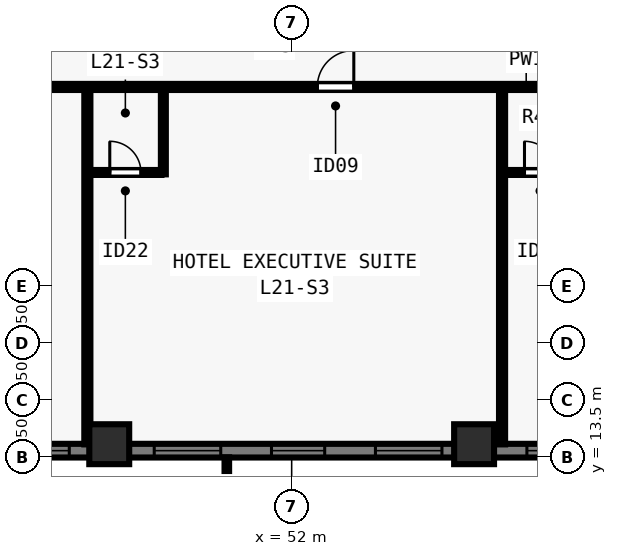
"""IFC4 building model, lengths in metres.
Left out: names, types, materials, properties, quantities, classifications, styles, units other than length and angle.
Written with IfcOpenShell. Run it as: python <this file> out.ifc"""

import sys

from ifc_helpers import new_model, si_unit, direction, frame, frame_2d, origin, origin_2d, place, context, subcontext, project, spatial, rectangle, extrude, element, fill, save


model = new_model("IFC4")
c1 = context("Model", 3, precision=1e-05, world=origin(), true_north=direction((0.0, 1.0)))
c2 = subcontext(c1, "Body", "Model", "MODEL_VIEW")
j1 = project(units=[si_unit("LENGTHUNIT", "METRE"), si_unit("PLANEANGLEUNIT", "RADIAN")], contexts=[c1])
p1 = place(None, origin())
s1 = spatial("IfcSite", under=j1, at=p1, CompositionType="ELEMENT")
p2 = place(p1, origin())
s2 = spatial("IfcBuilding", under=s1, at=p2, CompositionType="ELEMENT")
p3 = place(p2, frame((0.0, 0.0, 79.5)))
s3 = spatial("IfcBuildingStorey", under=s2, at=p3, CompositionType="ELEMENT", Elevation=79.5)
for number, where, z_axis, x_axis in (
    (1, (47.2, 13.85, 0.0), (0.0, 0.0, 1.0), (1.0, 0.0, 0.0)),
    (2, (56.8, 13.85, 0.0), (0.0, 0.0, 1.0), (1.0, 0.0, 0.0)),
):
    element("IfcColumn", number, at=place(p3, frame(where, z_axis=z_axis, x_axis=x_axis)), inside=s3, PredefinedType="COLUMN", context=c2, shape_type="SweptSolid", body=[
        extrude(rectangle(XDim=1.05, YDim=1.05, at=origin_2d()), origin(), (0.0, 0.0, 1.0), 3.5),
    ])
p4 = place(p3, frame((74.5, 13.68, 0.0), z_axis=(0.0, 0.0, 1.0), x_axis=(-1.0, 0.0, 0.0)))
e3 = element("IfcWall", 3, at=p4, inside=s3, PredefinedType="SOLIDWALL", context=c2, shape_type="SweptSolid", body=[
    extrude(rectangle(XDim=44.662, YDim=0.36, at=frame_2d((22.331, 0.0))), origin(), (0.0, 0.0, 1.0), 3.28),
])
p5 = place(p4, frame((4.655, 0.0, 0.8)))
e4 = element("IfcOpeningElement", 4, at=p5, cuts=e3, PredefinedType="OPENING", context=c2, shape_type="SweptSolid", body=[
    extrude(rectangle(XDim=1.75, YDim=1.544, at=frame_2d((0.875, 0.772))), frame((0.0, 0.19, 0.0), z_axis=(0.0, -1.0, 0.0), x_axis=(1.0, 0.0, 0.0)), (0.0, 0.0, 1.0), 0.38),
])
p6 = place(p4, frame((8.19, 0.0, 0.8)))
e5 = element("IfcOpeningElement", 5, at=p6, cuts=e3, PredefinedType="OPENING", context=c2, shape_type="SweptSolid", body=[
    extrude(rectangle(XDim=1.4, YDim=1.544, at=frame_2d((0.7, 0.772))), frame((0.0, 0.19, 0.0), z_axis=(0.0, -1.0, 0.0), x_axis=(1.0, 0.0, 0.0)), (0.0, 0.0, 1.0), 0.38),
])
p7 = place(p4, frame((11.375, 0.0, 0.8)))
e6 = element("IfcOpeningElement", 6, at=p7, cuts=e3, PredefinedType="OPENING", context=c2, shape_type="SweptSolid", body=[
    extrude(rectangle(XDim=1.75, YDim=1.544, at=frame_2d((0.875, 0.772))), frame((0.0, 0.19, 0.0), z_axis=(0.0, -1.0, 0.0), x_axis=(1.0, 0.0, 0.0)), (0.0, 0.0, 1.0), 0.38),
])
p8 = place(p4, frame((14.911, 0.0, 0.8)))
e7 = element("IfcOpeningElement", 7, at=p8, cuts=e3, PredefinedType="OPENING", context=c2, shape_type="SweptSolid", body=[
    extrude(rectangle(XDim=1.4, YDim=1.544, at=frame_2d((0.7, 0.772))), frame((0.0, 0.19, 0.0), z_axis=(0.0, -1.0, 0.0), x_axis=(1.0, 0.0, 0.0)), (0.0, 0.0, 1.0), 0.38),
])
p9 = place(p4, frame((18.546, 0.0, 0.8)))
e8 = element("IfcOpeningElement", 8, at=p9, cuts=e3, PredefinedType="OPENING", context=c2, shape_type="SweptSolid", body=[
    extrude(rectangle(XDim=1.75, YDim=1.544, at=frame_2d((0.875, 0.772))), frame((0.0, 0.19, 0.0), z_axis=(0.0, -1.0, 0.0), x_axis=(1.0, 0.0, 0.0)), (0.0, 0.0, 1.0), 0.38),
])
p10 = place(p4, frame((21.631, 0.0, 0.8)))
e9 = element("IfcOpeningElement", 9, at=p10, cuts=e3, PredefinedType="OPENING", context=c2, shape_type="SweptSolid", body=[
    extrude(rectangle(XDim=1.4, YDim=1.544, at=frame_2d((0.7, 0.772))), frame((0.0, 0.19, 0.0), z_axis=(0.0, -1.0, 0.0), x_axis=(1.0, 0.0, 0.0)), (0.0, 0.0, 1.0), 0.38),
])
p11 = place(p4, frame((24.366, 0.0, 0.8)))
e10 = element("IfcOpeningElement", 10, at=p11, cuts=e3, PredefinedType="OPENING", context=c2, shape_type="SweptSolid", body=[
    extrude(rectangle(XDim=1.75, YDim=1.544, at=frame_2d((0.875, 0.772))), frame((0.0, 0.19, 0.0), z_axis=(0.0, -1.0, 0.0), x_axis=(1.0, 0.0, 0.0)), (0.0, 0.0, 1.0), 0.38),
])
p12 = place(p4, frame((28.351, 0.0, 0.8)))
e11 = element("IfcOpeningElement", 11, at=p12, cuts=e3, PredefinedType="OPENING", context=c2, shape_type="SweptSolid", body=[
    extrude(rectangle(XDim=1.4, YDim=1.544, at=frame_2d((0.7, 0.772))), frame((0.0, 0.19, 0.0), z_axis=(0.0, -1.0, 0.0), x_axis=(1.0, 0.0, 0.0)), (0.0, 0.0, 1.0), 0.38),
])
p13 = place(p4, frame((31.537, 0.0, 0.8)))
e12 = element("IfcOpeningElement", 12, at=p13, cuts=e3, PredefinedType="OPENING", context=c2, shape_type="SweptSolid", body=[
    extrude(rectangle(XDim=1.75, YDim=1.544, at=frame_2d((0.875, 0.772))), frame((0.0, 0.19, 0.0), z_axis=(0.0, -1.0, 0.0), x_axis=(1.0, 0.0, 0.0)), (0.0, 0.0, 1.0), 0.38),
])
p14 = place(p4, frame((35.072, 0.0, 0.8)))
e13 = element("IfcOpeningElement", 13, at=p14, cuts=e3, PredefinedType="OPENING", context=c2, shape_type="SweptSolid", body=[
    extrude(rectangle(XDim=1.4, YDim=1.544, at=frame_2d((0.7, 0.772))), frame((0.0, 0.19, 0.0), z_axis=(0.0, -1.0, 0.0), x_axis=(1.0, 0.0, 0.0)), (0.0, 0.0, 1.0), 0.38),
])
p15 = place(p4, frame((38.257, 0.0, 0.8)))
e14 = element("IfcOpeningElement", 14, at=p15, cuts=e3, PredefinedType="OPENING", context=c2, shape_type="SweptSolid", body=[
    extrude(rectangle(XDim=1.75, YDim=1.544, at=frame_2d((0.875, 0.772))), frame((0.0, 0.19, 0.0), z_axis=(0.0, -1.0, 0.0), x_axis=(1.0, 0.0, 0.0)), (0.0, 0.0, 1.0), 0.38),
])
p16 = place(p3, frame((36.55, 23.25, 0.0), z_axis=(0.0, 0.0, 1.0), x_axis=(1.0, 0.0, 0.0)))
e15 = element("IfcWall", 15, at=p16, inside=s3, PredefinedType="PARTITIONING", context=c2, shape_type="SweptSolid", body=[
    extrude(rectangle(XDim=30.9, YDim=0.16, at=frame_2d((15.45, 0.0))), origin(), (0.0, 0.0, 1.0), 3.28),
])
p17 = place(p16, frame((1.13, 0.0, 0.0)))
e16 = element("IfcOpeningElement", 16, at=p17, cuts=e15, PredefinedType="OPENING", context=c2, shape_type="SweptSolid", body=[
    extrude(rectangle(XDim=0.96, YDim=2.15, at=frame_2d((0.48, 1.075))), frame((0.0, 0.09, 0.0), z_axis=(0.0, -1.0, 0.0), x_axis=(1.0, 0.0, 0.0)), (0.0, 0.0, 1.0), 0.18),
])
p18 = place(p16, frame((6.093, 0.0, 0.0)))
e17 = element("IfcOpeningElement", 17, at=p18, cuts=e15, PredefinedType="OPENING", context=c2, shape_type="SweptSolid", body=[
    extrude(rectangle(XDim=0.96, YDim=2.15, at=frame_2d((0.48, 1.075))), frame((0.0, 0.09, 0.0), z_axis=(0.0, -1.0, 0.0), x_axis=(1.0, 0.0, 0.0)), (0.0, 0.0, 1.0), 0.18),
])
p19 = place(p16, frame((16.125, 0.0, 0.0)))
e18 = element("IfcOpeningElement", 18, at=p19, cuts=e15, PredefinedType="OPENING", context=c2, shape_type="SweptSolid", body=[
    extrude(rectangle(XDim=0.96, YDim=2.15, at=frame_2d((0.48, 1.075))), frame((0.0, 0.09, 0.0), z_axis=(0.0, -1.0, 0.0), x_axis=(1.0, 0.0, 0.0)), (0.0, 0.0, 1.0), 0.18),
])
p20 = place(p16, frame((26.157, 0.0, 0.0)))
e19 = element("IfcOpeningElement", 19, at=p20, cuts=e15, PredefinedType="OPENING", context=c2, shape_type="SweptSolid", body=[
    extrude(rectangle(XDim=0.96, YDim=2.15, at=frame_2d((0.48, 1.075))), frame((0.0, 0.09, 0.0), z_axis=(0.0, -1.0, 0.0), x_axis=(1.0, 0.0, 0.0)), (0.0, 0.0, 1.0), 0.18),
])
p21 = place(p16, frame((28.92, 0.0, 0.0)))
e20 = element("IfcOpeningElement", 20, at=p21, cuts=e15, PredefinedType="OPENING", context=c2, shape_type="SweptSolid", body=[
    extrude(rectangle(XDim=0.96, YDim=2.15, at=frame_2d((0.48, 1.075))), frame((0.0, 0.09, 0.0), z_axis=(0.0, -1.0, 0.0), x_axis=(1.0, 0.0, 0.0)), (0.0, 0.0, 1.0), 0.18),
])
p22 = place(p3, frame((46.624, 13.845, 0.0), z_axis=(0.0, 0.0, 1.0), x_axis=(0.0, 1.0, 0.0)))
e21 = element("IfcWall", 21, at=p22, inside=s3, PredefinedType="PARTITIONING", context=c2, shape_type="SweptSolid", body=[
    extrude(rectangle(XDim=9.34, YDim=0.16, at=frame_2d((4.67, 0.0))), origin(), (0.0, 0.0, 1.0), 3.28),
])
p23 = place(p3, frame((48.624, 20.95, 0.0), z_axis=(0.0, 0.0, 1.0), x_axis=(0.0, 1.0, 0.0)))
e22 = element("IfcWall", 22, at=p23, inside=s3, PredefinedType="PLUMBINGWALL", context=c2, shape_type="SweptSolid", body=[
    extrude(rectangle(XDim=2.235, YDim=0.13, at=frame_2d((1.118, 0.0))), origin(), (0.0, 0.0, 1.0), 3.28),
])
p24 = place(p3, frame((46.689, 21.0, 0.0), z_axis=(0.0, 0.0, 1.0), x_axis=(1.0, 0.0, 0.0)))
e23 = element("IfcWall", 23, at=p24, inside=s3, PredefinedType="PLUMBINGWALL", context=c2, shape_type="SweptSolid", body=[
    extrude(rectangle(XDim=1.885, YDim=0.13, at=frame_2d((0.942, 0.0))), origin(), (0.0, 0.0, 1.0), 3.28),
])
p25 = place(p24, frame((0.525, 0.0, 0.0)))
e24 = element("IfcOpeningElement", 24, at=p25, cuts=e23, PredefinedType="OPENING", context=c2, shape_type="SweptSolid", body=[
    extrude(rectangle(XDim=0.82, YDim=2.1, at=frame_2d((0.41, 1.05))), frame((0.0, 0.075, 0.0), z_axis=(0.0, -1.0, 0.0), x_axis=(1.0, 0.0, 0.0)), (0.0, 0.0, 1.0), 0.15),
])
p26 = place(p3, frame((57.536, 13.845, 0.0), z_axis=(0.0, 0.0, 1.0), x_axis=(0.0, 1.0, 0.0)))
e25 = element("IfcWall", 25, at=p26, inside=s3, PredefinedType="PARTITIONING", context=c2, shape_type="SweptSolid", body=[
    extrude(rectangle(XDim=9.34, YDim=0.16, at=frame_2d((4.67, 0.0))), origin(), (0.0, 0.0, 1.0), 3.28),
])
p27 = place(p3, frame((57.601, 21.0, 0.0), z_axis=(0.0, 0.0, 1.0), x_axis=(1.0, 0.0, 0.0)))
e26 = element("IfcWall", 26, at=p27, inside=s3, PredefinedType="PLUMBINGWALL", context=c2, shape_type="SweptSolid", body=[
    extrude(rectangle(XDim=1.885, YDim=0.13, at=frame_2d((0.942, 0.0))), origin(), (0.0, 0.0, 1.0), 3.28),
])
p28 = place(p27, frame((0.525, 0.0, 0.0)))
e27 = element("IfcOpeningElement", 27, at=p28, cuts=e26, PredefinedType="OPENING", context=c2, shape_type="SweptSolid", body=[
    extrude(rectangle(XDim=0.82, YDim=2.1, at=frame_2d((0.41, 1.05))), frame((0.0, 0.075, 0.0), z_axis=(0.0, -1.0, 0.0), x_axis=(1.0, 0.0, 0.0)), (0.0, 0.0, 1.0), 0.15),
])
p29 = place(p8, origin())
e28 = element("IfcWindow", 28, at=p29, inside=s3, PartitioningType="SINGLE_PANEL", PredefinedType="WINDOW", context=c2, shape_type="SweptSolid", body=[
    extrude(rectangle(XDim=1.4, YDim=1.544, at=frame_2d((0.7, 0.772))), frame((0.0, -0.05, 0.0), z_axis=(0.0, -1.0, 0.0), x_axis=(1.0, 0.0, 0.0)), (0.0, 0.0, 1.0), 0.06),
])
fill(e7, e28)
p30 = place(p9, origin())
e29 = element("IfcWindow", 29, at=p30, inside=s3, PartitioningType="SINGLE_PANEL", PredefinedType="WINDOW", context=c2, shape_type="SweptSolid", body=[
    extrude(rectangle(XDim=1.75, YDim=1.544, at=frame_2d((0.875, 0.772))), frame((0.0, -0.05, 0.0), z_axis=(0.0, -1.0, 0.0), x_axis=(1.0, 0.0, 0.0)), (0.0, 0.0, 1.0), 0.06),
])
fill(e8, e29)
p31 = place(p10, origin())
e30 = element("IfcWindow", 30, at=p31, inside=s3, PartitioningType="SINGLE_PANEL", PredefinedType="WINDOW", context=c2, shape_type="SweptSolid", body=[
    extrude(rectangle(XDim=1.4, YDim=1.544, at=frame_2d((0.7, 0.772))), frame((0.0, -0.05, 0.0), z_axis=(0.0, -1.0, 0.0), x_axis=(1.0, 0.0, 0.0)), (0.0, 0.0, 1.0), 0.06),
])
fill(e9, e30)
p32 = place(p11, origin())
e31 = element("IfcWindow", 31, at=p32, inside=s3, PartitioningType="SINGLE_PANEL", PredefinedType="WINDOW", context=c2, shape_type="SweptSolid", body=[
    extrude(rectangle(XDim=1.75, YDim=1.544, at=frame_2d((0.875, 0.772))), frame((0.0, -0.05, 0.0), z_axis=(0.0, -1.0, 0.0), x_axis=(1.0, 0.0, 0.0)), (0.0, 0.0, 1.0), 0.06),
])
fill(e10, e31)
p33 = place(p12, origin())
e32 = element("IfcWindow", 32, at=p33, inside=s3, PartitioningType="SINGLE_PANEL", PredefinedType="WINDOW", context=c2, shape_type="SweptSolid", body=[
    extrude(rectangle(XDim=1.4, YDim=1.544, at=frame_2d((0.7, 0.772))), frame((0.0, -0.05, 0.0), z_axis=(0.0, -1.0, 0.0), x_axis=(1.0, 0.0, 0.0)), (0.0, 0.0, 1.0), 0.06),
])
fill(e11, e32)
p34 = place(p25, origin())
e33 = element("IfcDoor", 33, at=p34, inside=s3, OperationType="SINGLE_SWING_LEFT", PredefinedType="DOOR", context=c2, shape_type="SweptSolid", body=[
    extrude(rectangle(XDim=0.82, YDim=2.1, at=frame_2d((0.41, 1.05))), frame((0.0, 0.025, 0.0), z_axis=(0.0, -1.0, 0.0), x_axis=(1.0, 0.0, 0.0)), (0.0, 0.0, 1.0), 0.05),
])
fill(e24, e33)
p35 = place(p19, origin())
e34 = element("IfcDoor", 34, at=p35, inside=s3, OperationType="SINGLE_SWING_RIGHT", PredefinedType="DOOR", context=c2, shape_type="SweptSolid", body=[
    extrude(rectangle(XDim=0.96, YDim=2.15, at=frame_2d((0.48, 1.075))), frame((0.0, 0.025, 0.0), z_axis=(0.0, -1.0, 0.0), x_axis=(1.0, 0.0, 0.0)), (0.0, 0.0, 1.0), 0.05),
])
fill(e18, e34)
p36 = place(p28, origin())
e35 = element("IfcDoor", 35, at=p36, inside=s3, OperationType="SINGLE_SWING_LEFT", PredefinedType="DOOR", context=c2, shape_type="SweptSolid", body=[
    extrude(rectangle(XDim=0.82, YDim=2.1, at=frame_2d((0.41, 1.05))), frame((0.0, 0.025, 0.0), z_axis=(0.0, -1.0, 0.0), x_axis=(1.0, 0.0, 0.0)), (0.0, 0.0, 1.0), 0.05),
])
fill(e27, e35)
save(model, sys.argv[1])
